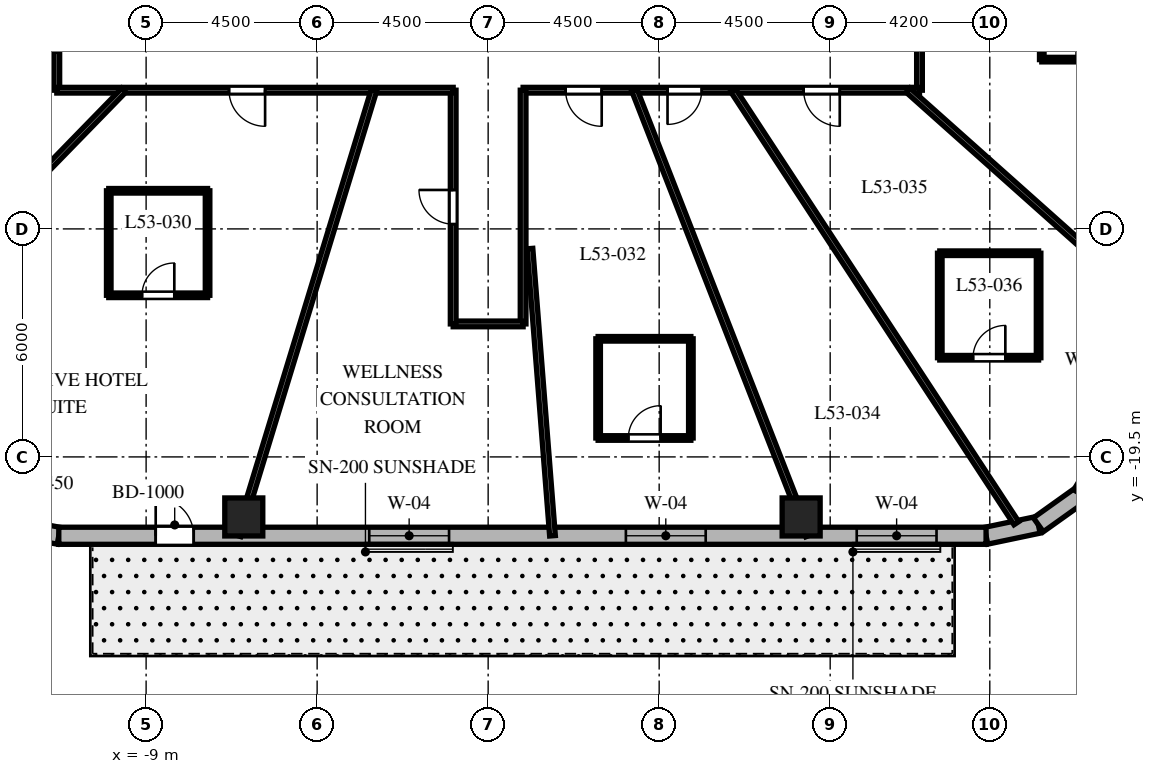
"""IFC4 building model, lengths in metres.
Left out: names, types, materials, properties, quantities, classifications, styles, units other than length and angle.
Written with IfcOpenShell. Run it as: python <this file> out.ifc"""

import sys

from ifc_helpers import new_model, si_unit, direction, frame, frame_2d, origin, origin_2d, place, context, subcontext, project, spatial, rectangle, extrude, element, fill, save


model = new_model("IFC4")
c1 = context("Model", 3, precision=1e-05, world=origin(), true_north=direction((0.0, 1.0)))
c2 = subcontext(c1, "Body", "Model", "MODEL_VIEW")
j1 = project(units=[si_unit("LENGTHUNIT", "METRE"), si_unit("PLANEANGLEUNIT", "RADIAN")], contexts=[c1])
p1 = place(None, origin())
s1 = spatial("IfcSite", under=j1, at=p1, CompositionType="ELEMENT")
p2 = place(p1, origin())
s2 = spatial("IfcBuilding", under=s1, at=p2, CompositionType="ELEMENT")
p3 = place(p2, frame((0.0, 0.0, 214.1)))
s3 = spatial("IfcBuildingStorey", under=s2, at=p3, CompositionType="ELEMENT", Elevation=214.1)
for number, where, z_axis, x_axis in (
    (1, (-6.43, -21.08, 0.0), (0.0, 0.0, 1.0), (1.0, 0.0, 0.0)),
    (2, (8.236, -21.08, 0.0), (0.0, 0.0, 1.0), (1.0, 0.0, 0.0)),
):
    element("IfcColumn", number, at=place(p3, frame(where, z_axis=z_axis, x_axis=x_axis)), inside=s3, PredefinedType="COLUMN", context=c2, shape_type="SweptSolid", body=[
        extrude(rectangle(XDim=1.0, YDim=1.0, at=origin_2d()), origin(), (0.0, 0.0, 1.0), 3.8),
    ])
p4 = place(p3, frame((-12.546, -21.34, 0.0), z_axis=(0.0, 0.0, 1.0), x_axis=(0.982686750835, -0.18527479519, 0.0)))
e3 = element("IfcWall", 3, at=p4, inside=s3, PredefinedType="SOLIDWALL", context=c2, shape_type="SweptSolid", body=[
    extrude(rectangle(XDim=1.27, YDim=0.45, at=frame_2d((0.635, 0.0))), origin(), (0.0, 0.0, 1.0), 3.5),
])
p5 = place(p3, frame((13.102, -21.575, 0.0), z_axis=(0.0, 0.0, 1.0), x_axis=(0.978757421505, 0.205021730188, 0.0)))
e4 = element("IfcWall", 4, at=p5, inside=s3, PredefinedType="SOLIDWALL", context=c2, shape_type="SweptSolid", body=[
    extrude(rectangle(XDim=1.406, YDim=0.45, at=frame_2d((0.703, 0.0))), origin(), (0.0, 0.0, 1.0), 3.5),
])
p6 = place(p3, frame((14.478, -21.287, 0.0), z_axis=(0.0, 0.0, 1.0), x_axis=(0.813888518617, 0.58102106611, 0.0)))
e5 = element("IfcWall", 5, at=p6, inside=s3, PredefinedType="SOLIDWALL", context=c2, shape_type="SweptSolid", body=[
    extrude(rectangle(XDim=1.383, YDim=0.45, at=frame_2d((0.691, 0.0))), origin(), (0.0, 0.0, 1.0), 3.5),
])
p7 = place(p3, frame((15.604, -20.483, 0.0), z_axis=(0.0, 0.0, 1.0), x_axis=(0.512222149036, 0.858852996756, 0.0)))
e6 = element("IfcWall", 6, at=p7, inside=s3, PredefinedType="SOLIDWALL", context=c2, shape_type="SweptSolid", body=[
    extrude(rectangle(XDim=1.406, YDim=0.45, at=frame_2d((0.703, 0.0))), origin(), (0.0, 0.0, 1.0), 3.5),
])
p8 = place(p3, frame((-11.298, -21.575, 0.0), z_axis=(0.0, 0.0, 1.0), x_axis=(1.0, 0.0, 0.0)))
e7 = element("IfcWall", 7, at=p8, inside=s3, PredefinedType="SOLIDWALL", context=c2, shape_type="SweptSolid", body=[
    extrude(rectangle(XDim=24.399, YDim=0.45, at=frame_2d((12.2, 0.0))), origin(), (0.0, 0.0, 1.0), 3.5),
])
p9 = place(p8, frame((2.55, 0.0, 0.0)))
e8 = element("IfcOpeningElement", 8, at=p9, cuts=e7, PredefinedType="OPENING", context=c2, shape_type="SweptSolid", body=[
    extrude(rectangle(XDim=1.0, YDim=2.15, at=frame_2d((0.5, 1.075))), frame((0.0, 0.235, 0.0), z_axis=(0.0, -1.0, 0.0), x_axis=(1.0, 0.0, 0.0)), (0.0, 0.0, 1.0), 0.47),
])
p10 = place(p8, frame((8.169, 0.0, 0.8)))
e9 = element("IfcOpeningElement", 9, at=p10, cuts=e7, PredefinedType="OPENING", context=c2, shape_type="SweptSolid", body=[
    extrude(rectangle(XDim=2.1, YDim=1.85, at=frame_2d((1.05, 0.925))), frame((0.0, 0.235, 0.0), z_axis=(0.0, -1.0, 0.0), x_axis=(1.0, 0.0, 0.0)), (0.0, 0.0, 1.0), 0.47),
])
p11 = place(p8, frame((14.922, 0.0, 0.8)))
e10 = element("IfcOpeningElement", 10, at=p11, cuts=e7, PredefinedType="OPENING", context=c2, shape_type="SweptSolid", body=[
    extrude(rectangle(XDim=2.1, YDim=1.85, at=frame_2d((1.05, 0.925))), frame((0.0, 0.235, 0.0), z_axis=(0.0, -1.0, 0.0), x_axis=(1.0, 0.0, 0.0)), (0.0, 0.0, 1.0), 0.47),
])
p12 = place(p8, frame((20.996, 0.0, 0.8)))
e11 = element("IfcOpeningElement", 11, at=p12, cuts=e7, PredefinedType="OPENING", context=c2, shape_type="SweptSolid", body=[
    extrude(rectangle(XDim=2.1, YDim=1.85, at=frame_2d((1.05, 0.925))), frame((0.0, 0.235, 0.0), z_axis=(0.0, -1.0, 0.0), x_axis=(1.0, 0.0, 0.0)), (0.0, 0.0, 1.0), 0.47),
])
p13 = place(p3, frame((-11.35, -9.85, 0.0), z_axis=(0.0, 0.0, 1.0), x_axis=(0.0, 1.0, 0.0)))
e12 = element("IfcWall", 12, at=p13, inside=s3, PredefinedType="PARTITIONING", context=c2, shape_type="SweptSolid", body=[
    extrude(rectangle(XDim=12.4, YDim=0.15, at=frame_2d((6.2, 0.0))), origin(), (0.0, 0.0, 1.0), 2.99),
])
p14 = place(p13, frame((10.017, 0.0, 0.0)))
e13 = element("IfcOpeningElement", 13, at=p14, cuts=e12, PredefinedType="OPENING", context=c2, shape_type="SweptSolid", body=[
    extrude(rectangle(XDim=0.9, YDim=2.03, at=frame_2d((0.45, 1.015))), frame((0.0, 0.085, 0.0), z_axis=(0.0, -1.0, 0.0), x_axis=(1.0, 0.0, 0.0)), (0.0, 0.0, 1.0), 0.17),
])
p15 = place(p13, frame((7.427, 0.0, 0.0)))
e14 = element("IfcOpeningElement", 14, at=p15, cuts=e12, PredefinedType="OPENING", context=c2, shape_type="SweptSolid", body=[
    extrude(rectangle(XDim=0.9, YDim=2.03, at=frame_2d((0.45, 1.015))), frame((0.0, 0.085, 0.0), z_axis=(0.0, -1.0, 0.0), x_axis=(1.0, 0.0, 0.0)), (0.0, 0.0, 1.0), 0.17),
])
p16 = place(p13, frame((3.01, 0.0, 0.0)))
e15 = element("IfcOpeningElement", 15, at=p16, cuts=e12, PredefinedType="OPENING", context=c2, shape_type="SweptSolid", body=[
    extrude(rectangle(XDim=0.95, YDim=2.03, at=frame_2d((0.475, 1.015))), frame((0.0, 0.085, 0.0), z_axis=(0.0, -1.0, 0.0), x_axis=(1.0, 0.0, 0.0)), (0.0, 0.0, 1.0), 0.17),
])
p17 = place(p3, frame((11.35, -4.4, 0.0), z_axis=(0.0, 0.0, 1.0), x_axis=(0.0, -1.0, 0.0)))
e16 = element("IfcWall", 16, at=p17, inside=s3, PredefinedType="PARTITIONING", context=c2, shape_type="SweptSolid", body=[
    extrude(rectangle(XDim=5.45, YDim=0.15, at=frame_2d((2.725, 0.0))), origin(), (0.0, 0.0, 1.0), 2.99),
])
p18 = place(p3, frame((11.35, -9.85, 0.0), z_axis=(0.0, 0.0, 1.0), x_axis=(-1.0, 0.0, 0.0)))
e17 = element("IfcWall", 17, at=p18, inside=s3, PredefinedType="PARTITIONING", context=c2, shape_type="SweptSolid", body=[
    extrude(rectangle(XDim=10.43, YDim=0.15, at=frame_2d((5.215, 0.0))), origin(), (0.0, 0.0, 1.0), 2.99),
])
p19 = place(p18, frame((8.362, 0.0, 0.0)))
e18 = element("IfcOpeningElement", 18, at=p19, cuts=e17, PredefinedType="OPENING", context=c2, shape_type="SweptSolid", body=[
    extrude(rectangle(XDim=0.95, YDim=2.03, at=frame_2d((0.475, 1.015))), frame((0.0, 0.085, 0.0), z_axis=(0.0, -1.0, 0.0), x_axis=(1.0, 0.0, 0.0)), (0.0, 0.0, 1.0), 0.17),
])
p20 = place(p18, frame((5.73, 0.0, 0.0)))
e19 = element("IfcOpeningElement", 19, at=p20, cuts=e17, PredefinedType="OPENING", context=c2, shape_type="SweptSolid", body=[
    extrude(rectangle(XDim=0.9, YDim=2.03, at=frame_2d((0.45, 1.015))), frame((0.0, 0.085, 0.0), z_axis=(0.0, -1.0, 0.0), x_axis=(1.0, 0.0, 0.0)), (0.0, 0.0, 1.0), 0.17),
])
p21 = place(p18, frame((2.098, 0.0, 0.0)))
e20 = element("IfcOpeningElement", 20, at=p21, cuts=e17, PredefinedType="OPENING", context=c2, shape_type="SweptSolid", body=[
    extrude(rectangle(XDim=0.95, YDim=2.03, at=frame_2d((0.475, 1.015))), frame((0.0, 0.085, 0.0), z_axis=(0.0, -1.0, 0.0), x_axis=(1.0, 0.0, 0.0)), (0.0, 0.0, 1.0), 0.17),
])
p22 = place(p3, frame((0.92, -9.85, 0.0), z_axis=(0.0, 0.0, 1.0), x_axis=(0.0, -1.0, 0.0)))
e21 = element("IfcWall", 21, at=p22, inside=s3, PredefinedType="PARTITIONING", context=c2, shape_type="SweptSolid", body=[
    extrude(rectangle(XDim=6.15, YDim=0.15, at=frame_2d((3.075, 0.0))), origin(), (0.0, 0.0, 1.0), 3.026),
])
p23 = place(p3, frame((0.92, -16.0, 0.0), z_axis=(0.0, 0.0, 1.0), x_axis=(-1.0, 0.0, 0.0)))
e22 = element("IfcWall", 22, at=p23, inside=s3, PredefinedType="PARTITIONING", context=c2, shape_type="SweptSolid", body=[
    extrude(rectangle(XDim=1.84, YDim=0.15, at=frame_2d((0.92, 0.0))), origin(), (0.0, 0.0, 1.0), 3.5),
])
p24 = place(p3, frame((-0.92, -16.0, 0.0), z_axis=(0.0, 0.0, 1.0), x_axis=(0.0, 1.0, 0.0)))
e23 = element("IfcWall", 23, at=p24, inside=s3, PredefinedType="PARTITIONING", context=c2, shape_type="SweptSolid", body=[
    extrude(rectangle(XDim=6.15, YDim=0.15, at=frame_2d((3.075, 0.0))), origin(), (0.0, 0.0, 1.0), 3.026),
])
p25 = place(p24, frame((2.625, 0.0, 0.0)))
e24 = element("IfcOpeningElement", 24, at=p25, cuts=e23, PredefinedType="OPENING", context=c2, shape_type="SweptSolid", body=[
    extrude(rectangle(XDim=0.9, YDim=2.03, at=frame_2d((0.45, 1.015))), frame((0.0, 0.085, 0.0), z_axis=(0.0, -1.0, 0.0), x_axis=(1.0, 0.0, 0.0)), (0.0, 0.0, 1.0), 0.17),
])
p26 = place(p3, frame((-0.92, -9.85, 0.0), z_axis=(0.0, 0.0, 1.0), x_axis=(-1.0, 0.0, 0.0)))
e25 = element("IfcWall", 25, at=p26, inside=s3, PredefinedType="PARTITIONING", context=c2, shape_type="SweptSolid", body=[
    extrude(rectangle(XDim=10.43, YDim=0.15, at=frame_2d((5.215, 0.0))), origin(), (0.0, 0.0, 1.0), 2.99),
])
p27 = place(p26, frame((4.949, 0.0, 0.0)))
e26 = element("IfcOpeningElement", 26, at=p27, cuts=e25, PredefinedType="OPENING", context=c2, shape_type="SweptSolid", body=[
    extrude(rectangle(XDim=0.95, YDim=2.03, at=frame_2d((0.475, 1.015))), frame((0.0, 0.085, 0.0), z_axis=(0.0, -1.0, 0.0), x_axis=(1.0, 0.0, 0.0)), (0.0, 0.0, 1.0), 0.17),
])
p28 = place(p3, frame((-9.588, -9.85, 0.0), z_axis=(0.0, 0.0, 1.0), x_axis=(-0.697519469595, -0.716565830567, 0.0)))
e27 = element("IfcWall", 27, at=p28, inside=s3, PredefinedType="PARTITIONING", context=c2, shape_type="SweptSolid", body=[
    extrude(rectangle(XDim=9.126, YDim=0.15, at=frame_2d((4.563, 0.0))), origin(), (0.0, 0.0, 1.0), 2.74),
])
p29 = place(p3, frame((-3.004, -9.85, 0.0), z_axis=(0.0, 0.0, 1.0), x_axis=(-0.291775760688, -0.956486751333, 0.0)))
e28 = element("IfcWall", 28, at=p29, inside=s3, PredefinedType="PARTITIONING", context=c2, shape_type="SweptSolid", body=[
    extrude(rectangle(XDim=12.258, YDim=0.15, at=frame_2d((6.129, 0.0))), origin(), (0.0, 0.0, 1.0), 2.74),
])
p30 = place(p3, frame((1.1, -14.018, 0.0), z_axis=(0.0, 0.0, 1.0), x_axis=(0.078228275349, -0.996935472804, 0.0)))
e29 = element("IfcWall", 29, at=p30, inside=s3, PredefinedType="PARTITIONING", context=c2, shape_type="SweptSolid", body=[
    extrude(rectangle(XDim=7.581, YDim=0.15, at=frame_2d((3.79, 0.0))), origin(), (0.0, 0.0, 1.0), 2.74),
])
p31 = place(p3, frame((3.848, -9.85, 0.0), z_axis=(0.0, 0.0, 1.0), x_axis=(0.363921778212, -0.931429513889, 0.0)))
e30 = element("IfcWall", 30, at=p31, inside=s3, PredefinedType="PARTITIONING", context=c2, shape_type="SweptSolid", body=[
    extrude(rectangle(XDim=12.588, YDim=0.15, at=frame_2d((6.294, 0.0))), origin(), (0.0, 0.0, 1.0), 2.74),
])
p32 = place(p3, frame((6.444, -9.85, 0.0), z_axis=(0.0, 0.0, 1.0), x_axis=(0.547492333129, -0.836810698525, 0.0)))
e31 = element("IfcWall", 31, at=p32, inside=s3, PredefinedType="PARTITIONING", context=c2, shape_type="SweptSolid", body=[
    extrude(rectangle(XDim=13.616, YDim=0.15, at=frame_2d((6.808, 0.0))), origin(), (0.0, 0.0, 1.0), 2.74),
])
p33 = place(p3, frame((11.048, -9.85, 0.0), z_axis=(0.0, 0.0, 1.0), x_axis=(0.746444434655, -0.665447748492, 0.0)))
e32 = element("IfcWall", 32, at=p33, inside=s3, PredefinedType="PARTITIONING", context=c2, shape_type="SweptSolid", body=[
    extrude(rectangle(XDim=8.732, YDim=0.15, at=frame_2d((4.366, 0.0))), origin(), (0.0, 0.0, 1.0), 2.74),
])
p34 = place(p3, frame((-9.983, -15.247, 0.0), z_axis=(0.0, 0.0, 1.0), x_axis=(1.0, 0.0, 0.0)))
e33 = element("IfcWall", 33, at=p34, inside=s3, PredefinedType="PARTITIONING", context=c2, shape_type="SweptSolid", body=[
    extrude(rectangle(XDim=2.6, YDim=0.12, at=frame_2d((1.3, 0.0))), origin(), (0.0, 0.0, 1.0), 3.072),
])
p35 = place(p34, frame((0.875, 0.0, 0.0)))
e34 = element("IfcOpeningElement", 34, at=p35, cuts=e33, PredefinedType="OPENING", context=c2, shape_type="SweptSolid", body=[
    extrude(rectangle(XDim=0.85, YDim=2.03, at=frame_2d((0.425, 1.015))), frame((0.0, 0.07, 0.0), z_axis=(0.0, -1.0, 0.0), x_axis=(1.0, 0.0, 0.0)), (0.0, 0.0, 1.0), 0.14),
])
p36 = place(p3, frame((-7.383, -15.247, 0.0), z_axis=(0.0, 0.0, 1.0), x_axis=(0.0, 1.0, 0.0)))
e35 = element("IfcWall", 35, at=p36, inside=s3, PredefinedType="PARTITIONING", context=c2, shape_type="SweptSolid", body=[
    extrude(rectangle(XDim=2.75, YDim=0.12, at=frame_2d((1.375, 0.0))), origin(), (0.0, 0.0, 1.0), 2.94),
])
p37 = place(p3, frame((-7.383, -12.497, 0.0), z_axis=(0.0, 0.0, 1.0), x_axis=(-1.0, 0.0, 0.0)))
e36 = element("IfcWall", 36, at=p37, inside=s3, PredefinedType="PARTITIONING", context=c2, shape_type="SweptSolid", body=[
    extrude(rectangle(XDim=2.6, YDim=0.12, at=frame_2d((1.3, 0.0))), origin(), (0.0, 0.0, 1.0), 2.94),
])
p38 = place(p3, frame((-9.983, -12.497, 0.0), z_axis=(0.0, 0.0, 1.0), x_axis=(0.0, -1.0, 0.0)))
e37 = element("IfcWall", 37, at=p38, inside=s3, PredefinedType="PARTITIONING", context=c2, shape_type="SweptSolid", body=[
    extrude(rectangle(XDim=2.75, YDim=0.12, at=frame_2d((1.375, 0.0))), origin(), (0.0, 0.0, 1.0), 3.072),
])
p39 = place(p3, frame((2.894, -19.002, 0.0), z_axis=(0.0, 0.0, 1.0), x_axis=(1.0, 0.0, 0.0)))
e38 = element("IfcWall", 38, at=p39, inside=s3, PredefinedType="PARTITIONING", context=c2, shape_type="SweptSolid", body=[
    extrude(rectangle(XDim=2.44, YDim=0.12, at=frame_2d((1.22, 0.0))), origin(), (0.0, 0.0, 1.0), 3.5),
])
p40 = place(p39, frame((0.795, 0.0, 0.0)))
e39 = element("IfcOpeningElement", 39, at=p40, cuts=e38, PredefinedType="OPENING", context=c2, shape_type="SweptSolid", body=[
    extrude(rectangle(XDim=0.85, YDim=2.03, at=frame_2d((0.425, 1.015))), frame((0.0, 0.07, 0.0), z_axis=(0.0, -1.0, 0.0), x_axis=(1.0, 0.0, 0.0)), (0.0, 0.0, 1.0), 0.14),
])
p41 = place(p3, frame((5.334, -19.002, 0.0), z_axis=(0.0, 0.0, 1.0), x_axis=(0.0, 1.0, 0.0)))
e40 = element("IfcWall", 40, at=p41, inside=s3, PredefinedType="PARTITIONING", context=c2, shape_type="SweptSolid", body=[
    extrude(rectangle(XDim=2.61, YDim=0.12, at=frame_2d((1.305, 0.0))), origin(), (0.0, 0.0, 1.0), 2.94),
])
p42 = place(p3, frame((5.334, -16.392, 0.0), z_axis=(0.0, 0.0, 1.0), x_axis=(-1.0, 0.0, 0.0)))
e41 = element("IfcWall", 41, at=p42, inside=s3, PredefinedType="PARTITIONING", context=c2, shape_type="SweptSolid", body=[
    extrude(rectangle(XDim=2.44, YDim=0.12, at=frame_2d((1.22, 0.0))), origin(), (0.0, 0.0, 1.0), 3.5),
])
p43 = place(p3, frame((2.894, -16.392, 0.0), z_axis=(0.0, 0.0, 1.0), x_axis=(0.0, -1.0, 0.0)))
e42 = element("IfcWall", 42, at=p43, inside=s3, PredefinedType="PARTITIONING", context=c2, shape_type="SweptSolid", body=[
    extrude(rectangle(XDim=2.61, YDim=0.12, at=frame_2d((1.305, 0.0))), origin(), (0.0, 0.0, 1.0), 2.94),
])
p44 = place(p3, frame((11.884, -16.89, 0.0), z_axis=(0.0, 0.0, 1.0), x_axis=(1.0, 0.0, 0.0)))
e43 = element("IfcWall", 43, at=p44, inside=s3, PredefinedType="PARTITIONING", context=c2, shape_type="SweptSolid", body=[
    extrude(rectangle(XDim=2.6, YDim=0.12, at=frame_2d((1.3, 0.0))), origin(), (0.0, 0.0, 1.0), 2.74),
])
p45 = place(p44, frame((0.875, 0.0, 0.0)))
e44 = element("IfcOpeningElement", 44, at=p45, cuts=e43, PredefinedType="OPENING", context=c2, shape_type="SweptSolid", body=[
    extrude(rectangle(XDim=0.85, YDim=2.03, at=frame_2d((0.425, 1.015))), frame((0.0, 0.07, 0.0), z_axis=(0.0, -1.0, 0.0), x_axis=(1.0, 0.0, 0.0)), (0.0, 0.0, 1.0), 0.14),
])
p46 = place(p3, frame((14.484, -16.89, 0.0), z_axis=(0.0, 0.0, 1.0), x_axis=(0.0, 1.0, 0.0)))
e45 = element("IfcWall", 45, at=p46, inside=s3, PredefinedType="PARTITIONING", context=c2, shape_type="SweptSolid", body=[
    extrude(rectangle(XDim=2.75, YDim=0.12, at=frame_2d((1.375, 0.0))), origin(), (0.0, 0.0, 1.0), 2.74),
])
p47 = place(p3, frame((14.484, -14.14, 0.0), z_axis=(0.0, 0.0, 1.0), x_axis=(-1.0, 0.0, 0.0)))
e46 = element("IfcWall", 46, at=p47, inside=s3, PredefinedType="PARTITIONING", context=c2, shape_type="SweptSolid", body=[
    extrude(rectangle(XDim=2.6, YDim=0.12, at=frame_2d((1.3, 0.0))), origin(), (0.0, 0.0, 1.0), 3.026),
])
p48 = place(p3, frame((11.884, -14.14, 0.0), z_axis=(0.0, 0.0, 1.0), x_axis=(0.0, -1.0, 0.0)))
e47 = element("IfcWall", 47, at=p48, inside=s3, PredefinedType="PARTITIONING", context=c2, shape_type="SweptSolid", body=[
    extrude(rectangle(XDim=2.75, YDim=0.12, at=frame_2d((1.375, 0.0))), origin(), (0.0, 0.0, 1.0), 3.026),
])
p49 = place(p3, frame((14.568, -9.045, 0.0), z_axis=(0.0, 0.0, 1.0), x_axis=(1.0, 0.0, 0.0)))
e48 = element("IfcWall", 48, at=p49, inside=s3, PredefinedType="PARTITIONING", context=c2, shape_type="SweptSolid", body=[
    extrude(rectangle(XDim=2.68, YDim=0.12, at=frame_2d((1.34, 0.0))), origin(), (0.0, 0.0, 1.0), 3.072),
])
p50 = place(p49, frame((0.915, 0.0, 0.0)))
e49 = element("IfcOpeningElement", 49, at=p50, cuts=e48, PredefinedType="OPENING", context=c2, shape_type="SweptSolid", body=[
    extrude(rectangle(XDim=0.85, YDim=2.03, at=frame_2d((0.425, 1.015))), frame((0.0, 0.07, 0.0), z_axis=(0.0, -1.0, 0.0), x_axis=(1.0, 0.0, 0.0)), (0.0, 0.0, 1.0), 0.14),
])
p51 = place(p3, frame((14.568, -6.505, 0.0), z_axis=(0.0, 0.0, 1.0), x_axis=(0.0, -1.0, 0.0)))
e50 = element("IfcWall", 50, at=p51, inside=s3, PredefinedType="PARTITIONING", context=c2, shape_type="SweptSolid", body=[
    extrude(rectangle(XDim=2.54, YDim=0.12, at=frame_2d((1.27, 0.0))), origin(), (0.0, 0.0, 1.0), 3.5),
])
p52 = place(p9, origin())
e51 = element("IfcDoor", 51, at=p52, inside=s3, OperationType="SINGLE_SWING_LEFT", PredefinedType="DOOR", context=c2, shape_type="SweptSolid", body=[
    extrude(rectangle(XDim=1.0, YDim=2.15, at=frame_2d((0.5, 1.075))), frame((0.0, 0.025, 0.0), z_axis=(0.0, -1.0, 0.0), x_axis=(1.0, 0.0, 0.0)), (0.0, 0.0, 1.0), 0.05),
])
fill(e8, e51)
p53 = place(p10, origin())
e52 = element("IfcWindow", 52, at=p53, inside=s3, PartitioningType="SINGLE_PANEL", PredefinedType="WINDOW", context=c2, shape_type="SweptSolid", body=[
    extrude(rectangle(XDim=2.1, YDim=1.85, at=frame_2d((1.05, 0.925))), frame((0.0, 0.03, 0.0), z_axis=(0.0, -1.0, 0.0), x_axis=(1.0, 0.0, 0.0)), (0.0, 0.0, 1.0), 0.06),
])
fill(e9, e52)
p54 = place(p11, origin())
e53 = element("IfcWindow", 53, at=p54, inside=s3, PartitioningType="SINGLE_PANEL", PredefinedType="WINDOW", context=c2, shape_type="SweptSolid", body=[
    extrude(rectangle(XDim=2.1, YDim=1.85, at=frame_2d((1.05, 0.925))), frame((0.0, 0.03, 0.0), z_axis=(0.0, -1.0, 0.0), x_axis=(1.0, 0.0, 0.0)), (0.0, 0.0, 1.0), 0.06),
])
fill(e10, e53)
p55 = place(p12, origin())
e54 = element("IfcWindow", 54, at=p55, inside=s3, PartitioningType="SINGLE_PANEL", PredefinedType="WINDOW", context=c2, shape_type="SweptSolid", body=[
    extrude(rectangle(XDim=2.1, YDim=1.85, at=frame_2d((1.05, 0.925))), frame((0.0, 0.03, 0.0), z_axis=(0.0, -1.0, 0.0), x_axis=(1.0, 0.0, 0.0)), (0.0, 0.0, 1.0), 0.06),
])
fill(e11, e54)
p56 = place(p27, origin())
e55 = element("IfcDoor", 55, at=p56, inside=s3, OperationType="SINGLE_SWING_LEFT", PredefinedType="DOOR", context=c2, shape_type="SweptSolid", body=[
    extrude(rectangle(XDim=0.95, YDim=2.03, at=frame_2d((0.475, 1.015))), frame((0.0, 0.025, 0.0), z_axis=(0.0, -1.0, 0.0), x_axis=(1.0, 0.0, 0.0)), (0.0, 0.0, 1.0), 0.05),
])
fill(e26, e55)
p57 = place(p35, origin())
e56 = element("IfcDoor", 56, at=p57, inside=s3, OperationType="SINGLE_SWING_RIGHT", PredefinedType="DOOR", context=c2, shape_type="SweptSolid", body=[
    extrude(rectangle(XDim=0.85, YDim=2.03, at=frame_2d((0.425, 1.015))), frame((0.0, 0.025, 0.0), z_axis=(0.0, -1.0, 0.0), x_axis=(1.0, 0.0, 0.0)), (0.0, 0.0, 1.0), 0.05),
])
fill(e34, e56)
p58 = place(p25, origin())
e57 = element("IfcDoor", 57, at=p58, inside=s3, OperationType="SINGLE_SWING_RIGHT", PredefinedType="DOOR", context=c2, shape_type="SweptSolid", body=[
    extrude(rectangle(XDim=0.9, YDim=2.03, at=frame_2d((0.45, 1.015))), frame((0.0, 0.025, 0.0), z_axis=(0.0, -1.0, 0.0), x_axis=(1.0, 0.0, 0.0)), (0.0, 0.0, 1.0), 0.05),
])
fill(e24, e57)
p59 = place(p19, origin())
e58 = element("IfcDoor", 58, at=p59, inside=s3, OperationType="SINGLE_SWING_LEFT", PredefinedType="DOOR", context=c2, shape_type="SweptSolid", body=[
    extrude(rectangle(XDim=0.95, YDim=2.03, at=frame_2d((0.475, 1.015))), frame((0.0, 0.025, 0.0), z_axis=(0.0, -1.0, 0.0), x_axis=(1.0, 0.0, 0.0)), (0.0, 0.0, 1.0), 0.05),
])
fill(e18, e58)
p60 = place(p40, origin())
e59 = element("IfcDoor", 59, at=p60, inside=s3, OperationType="SINGLE_SWING_RIGHT", PredefinedType="DOOR", context=c2, shape_type="SweptSolid", body=[
    extrude(rectangle(XDim=0.85, YDim=2.03, at=frame_2d((0.425, 1.015))), frame((0.0, 0.025, 0.0), z_axis=(0.0, -1.0, 0.0), x_axis=(1.0, 0.0, 0.0)), (0.0, 0.0, 1.0), 0.05),
])
fill(e39, e59)
p61 = place(p20, origin())
e60 = element("IfcDoor", 60, at=p61, inside=s3, OperationType="SINGLE_SWING_RIGHT", PredefinedType="DOOR", context=c2, shape_type="SweptSolid", body=[
    extrude(rectangle(XDim=0.9, YDim=2.03, at=frame_2d((0.45, 1.015))), frame((0.0, 0.025, 0.0), z_axis=(0.0, -1.0, 0.0), x_axis=(1.0, 0.0, 0.0)), (0.0, 0.0, 1.0), 0.05),
])
fill(e19, e60)
p62 = place(p21, origin())
e61 = element("IfcDoor", 61, at=p62, inside=s3, OperationType="SINGLE_SWING_LEFT", PredefinedType="DOOR", context=c2, shape_type="SweptSolid", body=[
    extrude(rectangle(XDim=0.95, YDim=2.03, at=frame_2d((0.475, 1.015))), frame((0.0, 0.025, 0.0), z_axis=(0.0, -1.0, 0.0), x_axis=(1.0, 0.0, 0.0)), (0.0, 0.0, 1.0), 0.05),
])
fill(e20, e61)
p63 = place(p45, origin())
e62 = element("IfcDoor", 62, at=p63, inside=s3, OperationType="SINGLE_SWING_RIGHT", PredefinedType="DOOR", context=c2, shape_type="SweptSolid", body=[
    extrude(rectangle(XDim=0.85, YDim=2.03, at=frame_2d((0.425, 1.015))), frame((0.0, 0.025, 0.0), z_axis=(0.0, -1.0, 0.0), x_axis=(1.0, 0.0, 0.0)), (0.0, 0.0, 1.0), 0.05),
])
fill(e44, e62)
p64 = place(p50, origin())
e63 = element("IfcDoor", 63, at=p64, inside=s3, OperationType="SINGLE_SWING_LEFT", PredefinedType="DOOR", context=c2, shape_type="SweptSolid", body=[
    extrude(rectangle(XDim=0.85, YDim=2.03, at=frame_2d((0.425, 1.015))), frame((0.0, 0.025, 0.0), z_axis=(0.0, -1.0, 0.0), x_axis=(1.0, 0.0, 0.0)), (0.0, 0.0, 1.0), 0.05),
])
fill(e49, e63)
save(model, sys.argv[1])
